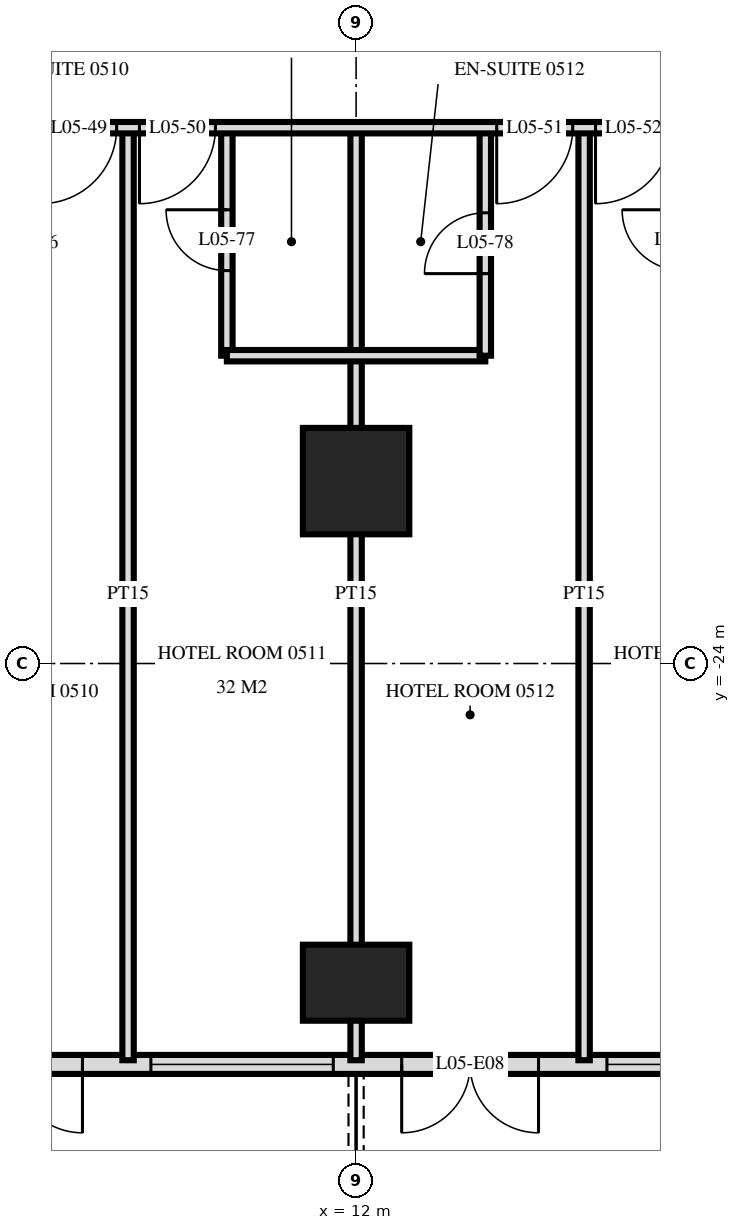
"""IFC4 building model, lengths in metres.
Left out: names, types, materials, properties, quantities, classifications, styles, units other than length and angle.
Written with IfcOpenShell. Run it as: python <this file> out.ifc"""

import sys

from ifc_helpers import new_model, si_unit, direction, frame, frame_2d, origin, origin_2d, place, context, subcontext, project, spatial, rectangle, extrude, element, fill, save


model = new_model("IFC4")
c1 = context("Model", 3, precision=1e-05, world=origin(), true_north=direction((0.0, 1.0)))
c2 = subcontext(c1, "Body", "Model", "MODEL_VIEW")
j1 = project(units=[si_unit("LENGTHUNIT", "METRE"), si_unit("PLANEANGLEUNIT", "RADIAN")], contexts=[c1])
p1 = place(None, origin())
s1 = spatial("IfcSite", under=j1, at=p1, CompositionType="ELEMENT")
p2 = place(p1, origin())
s2 = spatial("IfcBuilding", under=s1, at=p2, CompositionType="ELEMENT")
p3 = place(p2, frame((0.0, 0.0, 27.6)))
s3 = spatial("IfcBuildingStorey", under=s2, at=p3, CompositionType="ELEMENT", Elevation=27.6)
p4 = place(p3, frame((12.0, -28.2, 0.0), z_axis=(0.0, 0.0, 1.0), x_axis=(1.0, 0.0, 0.0)))
e1 = element("IfcColumn", 1, at=p4, inside=s3, PredefinedType="COLUMN", context=c2, shape_type="SweptSolid", body=[
    extrude(rectangle(XDim=1.4, YDim=1.0, at=origin_2d()), origin(), (0.0, 0.0, 1.0), 3.6),
])
p5 = place(p3, frame((12.0, -21.6, 0.0), z_axis=(0.0, 0.0, 1.0), x_axis=(1.0, 0.0, 0.0)))
e2 = element("IfcColumn", 2, at=p5, inside=s3, PredefinedType="COLUMN", context=c2, shape_type="SweptSolid", body=[
    extrude(rectangle(XDim=1.4, YDim=1.4, at=origin_2d()), origin(), (0.0, 0.0, 1.0), 3.6),
])
p6 = place(p3, frame((-28.775, -29.275, 0.0), z_axis=(0.0, 0.0, 1.0), x_axis=(1.0, 0.0, 0.0)))
e3 = element("IfcWall", 3, at=p6, inside=s3, PredefinedType="SOLIDWALL", context=c2, shape_type="SweptSolid", body=[
    extrude(rectangle(XDim=57.551, YDim=0.25, at=frame_2d((28.775, 0.0))), origin(), (0.0, 0.0, 1.0), 3.32),
])
p7 = place(p6, frame((0.575, 0.0, 0.0)))
e4 = element("IfcOpeningElement", 4, at=p7, cuts=e3, PredefinedType="OPENING", context=c2, shape_type="SweptSolid", body=[
    extrude(rectangle(XDim=1.8, YDim=2.4, at=frame_2d((0.9, 1.2))), frame((0.0, 0.135, 0.0), z_axis=(0.0, -1.0, 0.0), x_axis=(1.0, 0.0, 0.0)), (0.0, 0.0, 1.0), 0.27),
])
p8 = place(p6, frame((5.375, 0.0, 0.0)))
e5 = element("IfcOpeningElement", 5, at=p8, cuts=e3, PredefinedType="OPENING", context=c2, shape_type="SweptSolid", body=[
    extrude(rectangle(XDim=1.8, YDim=2.4, at=frame_2d((0.9, 1.2))), frame((0.0, 0.135, 0.0), z_axis=(0.0, -1.0, 0.0), x_axis=(1.0, 0.0, 0.0)), (0.0, 0.0, 1.0), 0.27),
])
p9 = place(p6, frame((8.075, 0.0, 0.3)))
e6 = element("IfcOpeningElement", 6, at=p9, cuts=e3, PredefinedType="OPENING", context=c2, shape_type="SweptSolid", body=[
    extrude(rectangle(XDim=2.4, YDim=2.1, at=frame_2d((1.2, 1.05))), frame((0.0, 0.135, 0.0), z_axis=(0.0, -1.0, 0.0), x_axis=(1.0, 0.0, 0.0)), (0.0, 0.0, 1.0), 0.27),
])
p10 = place(p6, frame((11.375, 0.0, 0.0)))
e7 = element("IfcOpeningElement", 7, at=p10, cuts=e3, PredefinedType="OPENING", context=c2, shape_type="SweptSolid", body=[
    extrude(rectangle(XDim=1.8, YDim=2.4, at=frame_2d((0.9, 1.2))), frame((0.0, 0.135, 0.0), z_axis=(0.0, -1.0, 0.0), x_axis=(1.0, 0.0, 0.0)), (0.0, 0.0, 1.0), 0.27),
])
p11 = place(p6, frame((14.075, 0.0, 0.3)))
e8 = element("IfcOpeningElement", 8, at=p11, cuts=e3, PredefinedType="OPENING", context=c2, shape_type="SweptSolid", body=[
    extrude(rectangle(XDim=2.4, YDim=2.1, at=frame_2d((1.2, 1.05))), frame((0.0, 0.135, 0.0), z_axis=(0.0, -1.0, 0.0), x_axis=(1.0, 0.0, 0.0)), (0.0, 0.0, 1.0), 0.27),
])
p12 = place(p6, frame((17.375, 0.0, 0.0)))
e9 = element("IfcOpeningElement", 9, at=p12, cuts=e3, PredefinedType="OPENING", context=c2, shape_type="SweptSolid", body=[
    extrude(rectangle(XDim=1.8, YDim=2.4, at=frame_2d((0.9, 1.2))), frame((0.0, 0.135, 0.0), z_axis=(0.0, -1.0, 0.0), x_axis=(1.0, 0.0, 0.0)), (0.0, 0.0, 1.0), 0.27),
])
p13 = place(p6, frame((20.075, 0.0, 0.3)))
e10 = element("IfcOpeningElement", 10, at=p13, cuts=e3, PredefinedType="OPENING", context=c2, shape_type="SweptSolid", body=[
    extrude(rectangle(XDim=2.4, YDim=2.1, at=frame_2d((1.2, 1.05))), frame((0.0, 0.135, 0.0), z_axis=(0.0, -1.0, 0.0), x_axis=(1.0, 0.0, 0.0)), (0.0, 0.0, 1.0), 0.27),
])
p14 = place(p6, frame((23.075, 0.0, 0.3)))
e11 = element("IfcOpeningElement", 11, at=p14, cuts=e3, PredefinedType="OPENING", context=c2, shape_type="SweptSolid", body=[
    extrude(rectangle(XDim=2.4, YDim=2.1, at=frame_2d((1.2, 1.05))), frame((0.0, 0.135, 0.0), z_axis=(0.0, -1.0, 0.0), x_axis=(1.0, 0.0, 0.0)), (0.0, 0.0, 1.0), 0.27),
])
p15 = place(p6, frame((26.375, 0.0, 0.0)))
e12 = element("IfcOpeningElement", 12, at=p15, cuts=e3, PredefinedType="OPENING", context=c2, shape_type="SweptSolid", body=[
    extrude(rectangle(XDim=1.8, YDim=2.4, at=frame_2d((0.9, 1.2))), frame((0.0, 0.135, 0.0), z_axis=(0.0, -1.0, 0.0), x_axis=(1.0, 0.0, 0.0)), (0.0, 0.0, 1.0), 0.27),
])
p16 = place(p6, frame((29.375, 0.0, 0.0)))
e13 = element("IfcOpeningElement", 13, at=p16, cuts=e3, PredefinedType="OPENING", context=c2, shape_type="SweptSolid", body=[
    extrude(rectangle(XDim=1.8, YDim=2.4, at=frame_2d((0.9, 1.2))), frame((0.0, 0.135, 0.0), z_axis=(0.0, -1.0, 0.0), x_axis=(1.0, 0.0, 0.0)), (0.0, 0.0, 1.0), 0.27),
])
p17 = place(p6, frame((32.075, 0.0, 0.3)))
e14 = element("IfcOpeningElement", 14, at=p17, cuts=e3, PredefinedType="OPENING", context=c2, shape_type="SweptSolid", body=[
    extrude(rectangle(XDim=2.4, YDim=2.1, at=frame_2d((1.2, 1.05))), frame((0.0, 0.135, 0.0), z_axis=(0.0, -1.0, 0.0), x_axis=(1.0, 0.0, 0.0)), (0.0, 0.0, 1.0), 0.27),
])
p18 = place(p6, frame((35.375, 0.0, 0.0)))
e15 = element("IfcOpeningElement", 15, at=p18, cuts=e3, PredefinedType="OPENING", context=c2, shape_type="SweptSolid", body=[
    extrude(rectangle(XDim=1.8, YDim=2.4, at=frame_2d((0.9, 1.2))), frame((0.0, 0.135, 0.0), z_axis=(0.0, -1.0, 0.0), x_axis=(1.0, 0.0, 0.0)), (0.0, 0.0, 1.0), 0.27),
])
p19 = place(p6, frame((38.075, 0.0, 0.3)))
e16 = element("IfcOpeningElement", 16, at=p19, cuts=e3, PredefinedType="OPENING", context=c2, shape_type="SweptSolid", body=[
    extrude(rectangle(XDim=2.4, YDim=2.1, at=frame_2d((1.2, 1.05))), frame((0.0, 0.135, 0.0), z_axis=(0.0, -1.0, 0.0), x_axis=(1.0, 0.0, 0.0)), (0.0, 0.0, 1.0), 0.27),
])
p20 = place(p6, frame((41.375, 0.0, 0.0)))
e17 = element("IfcOpeningElement", 17, at=p20, cuts=e3, PredefinedType="OPENING", context=c2, shape_type="SweptSolid", body=[
    extrude(rectangle(XDim=1.8, YDim=2.4, at=frame_2d((0.9, 1.2))), frame((0.0, 0.135, 0.0), z_axis=(0.0, -1.0, 0.0), x_axis=(1.0, 0.0, 0.0)), (0.0, 0.0, 1.0), 0.27),
])
p21 = place(p6, frame((44.075, 0.0, 0.3)))
e18 = element("IfcOpeningElement", 18, at=p21, cuts=e3, PredefinedType="OPENING", context=c2, shape_type="SweptSolid", body=[
    extrude(rectangle(XDim=2.4, YDim=2.1, at=frame_2d((1.2, 1.05))), frame((0.0, 0.135, 0.0), z_axis=(0.0, -1.0, 0.0), x_axis=(1.0, 0.0, 0.0)), (0.0, 0.0, 1.0), 0.27),
])
p22 = place(p6, frame((47.075, 0.0, 0.3)))
e19 = element("IfcOpeningElement", 19, at=p22, cuts=e3, PredefinedType="OPENING", context=c2, shape_type="SweptSolid", body=[
    extrude(rectangle(XDim=2.4, YDim=2.1, at=frame_2d((1.2, 1.05))), frame((0.0, 0.135, 0.0), z_axis=(0.0, -1.0, 0.0), x_axis=(1.0, 0.0, 0.0)), (0.0, 0.0, 1.0), 0.27),
])
p23 = place(p6, frame((50.375, 0.0, 0.0)))
e20 = element("IfcOpeningElement", 20, at=p23, cuts=e3, PredefinedType="OPENING", context=c2, shape_type="SweptSolid", body=[
    extrude(rectangle(XDim=1.8, YDim=2.4, at=frame_2d((0.9, 1.2))), frame((0.0, 0.135, 0.0), z_axis=(0.0, -1.0, 0.0), x_axis=(1.0, 0.0, 0.0)), (0.0, 0.0, 1.0), 0.27),
])
p24 = place(p6, frame((53.375, 0.0, 0.0)))
e21 = element("IfcOpeningElement", 21, at=p24, cuts=e3, PredefinedType="OPENING", context=c2, shape_type="SweptSolid", body=[
    extrude(rectangle(XDim=1.8, YDim=2.4, at=frame_2d((0.9, 1.2))), frame((0.0, 0.135, 0.0), z_axis=(0.0, -1.0, 0.0), x_axis=(1.0, 0.0, 0.0)), (0.0, 0.0, 1.0), 0.27),
])
p25 = place(p3, frame((15.0, -29.22, 0.0), z_axis=(0.0, 0.0, 1.0), x_axis=(0.0, 1.0, 0.0)))
e22 = element("IfcWall", 22, at=p25, inside=s3, PredefinedType="PARTITIONING", context=c2, shape_type="SweptSolid", body=[
    extrude(rectangle(XDim=12.27, YDim=0.15, at=frame_2d((6.135, 0.0))), origin(), (0.0, 0.0, 1.0), 3.32),
])
p26 = place(p3, frame((13.7, -19.95, 0.0), z_axis=(0.0, 0.0, 1.0), x_axis=(0.0, 1.0, 0.0)))
e23 = element("IfcWall", 23, at=p26, inside=s3, PredefinedType="PARTITIONING", context=c2, shape_type="SweptSolid", body=[
    extrude(rectangle(XDim=3.0, YDim=0.15, at=frame_2d((1.5, 0.0))), origin(), (0.0, 0.0, 1.0), 3.32),
])
p27 = place(p26, frame((1.08, 0.0, 0.0)))
e24 = element("IfcOpeningElement", 24, at=p27, cuts=e23, PredefinedType="OPENING", context=c2, shape_type="SweptSolid", body=[
    extrude(rectangle(XDim=0.8, YDim=2.1, at=frame_2d((0.4, 1.05))), frame((0.0, 0.085, 0.0), z_axis=(0.0, -1.0, 0.0), x_axis=(1.0, 0.0, 0.0)), (0.0, 0.0, 1.0), 0.17),
])
p28 = place(p3, frame((12.0, -29.22, 0.0), z_axis=(0.0, 0.0, 1.0), x_axis=(0.0, 1.0, 0.0)))
e25 = element("IfcWall", 25, at=p28, inside=s3, PredefinedType="PARTITIONING", context=c2, shape_type="SweptSolid", body=[
    extrude(rectangle(XDim=12.27, YDim=0.15, at=frame_2d((6.135, 0.0))), origin(), (0.0, 0.0, 1.0), 3.32),
])
p29 = place(p3, frame((10.3, -19.95, 0.0), z_axis=(0.0, 0.0, 1.0), x_axis=(0.0, 1.0, 0.0)))
e26 = element("IfcWall", 26, at=p29, inside=s3, PredefinedType="PARTITIONING", context=c2, shape_type="SweptSolid", body=[
    extrude(rectangle(XDim=3.0, YDim=0.15, at=frame_2d((1.5, 0.0))), origin(), (0.0, 0.0, 1.0), 3.32),
])
p30 = place(p29, frame((1.12, 0.0, 0.0)))
e27 = element("IfcOpeningElement", 27, at=p30, cuts=e26, PredefinedType="OPENING", context=c2, shape_type="SweptSolid", body=[
    extrude(rectangle(XDim=0.8, YDim=2.1, at=frame_2d((0.4, 1.05))), frame((0.0, 0.085, 0.0), z_axis=(0.0, -1.0, 0.0), x_axis=(1.0, 0.0, 0.0)), (0.0, 0.0, 1.0), 0.17),
])
p31 = place(p3, frame((9.0, -29.22, 0.0), z_axis=(0.0, 0.0, 1.0), x_axis=(0.0, 1.0, 0.0)))
e28 = element("IfcWall", 28, at=p31, inside=s3, PredefinedType="PARTITIONING", context=c2, shape_type="SweptSolid", body=[
    extrude(rectangle(XDim=12.27, YDim=0.15, at=frame_2d((6.135, 0.0))), origin(), (0.0, 0.0, 1.0), 3.32),
])
p32 = place(p3, frame((10.3, -19.95, 0.0), z_axis=(0.0, 0.0, 1.0), x_axis=(1.0, 0.0, 0.0)))
e29 = element("IfcWall", 29, at=p32, inside=s3, PredefinedType="PARTITIONING", context=c2, shape_type="SweptSolid", body=[
    extrude(rectangle(XDim=3.4, YDim=0.15, at=frame_2d((1.7, 0.0))), origin(), (0.0, 0.0, 1.0), 3.32),
])
p33 = place(p3, frame((-33.12, -16.95, 0.0), z_axis=(0.0, 0.0, 1.0), x_axis=(1.0, 0.0, 0.0)))
e30 = element("IfcWall", 30, at=p33, inside=s3, PredefinedType="PARTITIONING", context=c2, shape_type="SweptSolid", body=[
    extrude(rectangle(XDim=66.24, YDim=0.15, at=frame_2d((33.12, 0.0))), origin(), (0.0, 0.0, 1.0), 3.32),
])
p34 = place(p33, frame((9.27, 0.0, 0.0)))
e31 = element("IfcOpeningElement", 31, at=p34, cuts=e30, PredefinedType="OPENING", context=c2, shape_type="SweptSolid", body=[
    extrude(rectangle(XDim=1.0, YDim=2.1, at=frame_2d((0.5, 1.05))), frame((0.0, 0.085, 0.0), z_axis=(0.0, -1.0, 0.0), x_axis=(1.0, 0.0, 0.0)), (0.0, 0.0, 1.0), 0.17),
])
p35 = place(p33, frame((13.97, 0.0, 0.0)))
e32 = element("IfcOpeningElement", 32, at=p35, cuts=e30, PredefinedType="OPENING", context=c2, shape_type="SweptSolid", body=[
    extrude(rectangle(XDim=1.0, YDim=2.1, at=frame_2d((0.5, 1.05))), frame((0.0, 0.085, 0.0), z_axis=(0.0, -1.0, 0.0), x_axis=(1.0, 0.0, 0.0)), (0.0, 0.0, 1.0), 0.17),
])
p36 = place(p33, frame((15.27, 0.0, 0.0)))
e33 = element("IfcOpeningElement", 33, at=p36, cuts=e30, PredefinedType="OPENING", context=c2, shape_type="SweptSolid", body=[
    extrude(rectangle(XDim=1.0, YDim=2.1, at=frame_2d((0.5, 1.05))), frame((0.0, 0.085, 0.0), z_axis=(0.0, -1.0, 0.0), x_axis=(1.0, 0.0, 0.0)), (0.0, 0.0, 1.0), 0.17),
])
p37 = place(p33, frame((19.97, 0.0, 0.0)))
e34 = element("IfcOpeningElement", 34, at=p37, cuts=e30, PredefinedType="OPENING", context=c2, shape_type="SweptSolid", body=[
    extrude(rectangle(XDim=1.0, YDim=2.1, at=frame_2d((0.5, 1.05))), frame((0.0, 0.085, 0.0), z_axis=(0.0, -1.0, 0.0), x_axis=(1.0, 0.0, 0.0)), (0.0, 0.0, 1.0), 0.17),
])
p38 = place(p33, frame((22.27, 0.0, 0.0)))
e35 = element("IfcOpeningElement", 35, at=p38, cuts=e30, PredefinedType="OPENING", context=c2, shape_type="SweptSolid", body=[
    extrude(rectangle(XDim=1.0, YDim=2.1, at=frame_2d((0.5, 1.05))), frame((0.0, 0.085, 0.0), z_axis=(0.0, -1.0, 0.0), x_axis=(1.0, 0.0, 0.0)), (0.0, 0.0, 1.0), 0.17),
])
p39 = place(p33, frame((28.97, 0.0, 0.0)))
e36 = element("IfcOpeningElement", 36, at=p39, cuts=e30, PredefinedType="OPENING", context=c2, shape_type="SweptSolid", body=[
    extrude(rectangle(XDim=1.0, YDim=2.1, at=frame_2d((0.5, 1.05))), frame((0.0, 0.085, 0.0), z_axis=(0.0, -1.0, 0.0), x_axis=(1.0, 0.0, 0.0)), (0.0, 0.0, 1.0), 0.17),
])
p40 = place(p33, frame((30.27, 0.0, 0.0)))
e37 = element("IfcOpeningElement", 37, at=p40, cuts=e30, PredefinedType="OPENING", context=c2, shape_type="SweptSolid", body=[
    extrude(rectangle(XDim=1.0, YDim=2.1, at=frame_2d((0.5, 1.05))), frame((0.0, 0.085, 0.0), z_axis=(0.0, -1.0, 0.0), x_axis=(1.0, 0.0, 0.0)), (0.0, 0.0, 1.0), 0.17),
])
p41 = place(p33, frame((34.97, 0.0, 0.0)))
e38 = element("IfcOpeningElement", 38, at=p41, cuts=e30, PredefinedType="OPENING", context=c2, shape_type="SweptSolid", body=[
    extrude(rectangle(XDim=1.0, YDim=2.1, at=frame_2d((0.5, 1.05))), frame((0.0, 0.085, 0.0), z_axis=(0.0, -1.0, 0.0), x_axis=(1.0, 0.0, 0.0)), (0.0, 0.0, 1.0), 0.17),
])
p42 = place(p33, frame((36.27, 0.0, 0.0)))
e39 = element("IfcOpeningElement", 39, at=p42, cuts=e30, PredefinedType="OPENING", context=c2, shape_type="SweptSolid", body=[
    extrude(rectangle(XDim=1.0, YDim=2.1, at=frame_2d((0.5, 1.05))), frame((0.0, 0.085, 0.0), z_axis=(0.0, -1.0, 0.0), x_axis=(1.0, 0.0, 0.0)), (0.0, 0.0, 1.0), 0.17),
])
p43 = place(p33, frame((40.97, 0.0, 0.0)))
e40 = element("IfcOpeningElement", 40, at=p43, cuts=e30, PredefinedType="OPENING", context=c2, shape_type="SweptSolid", body=[
    extrude(rectangle(XDim=1.0, YDim=2.1, at=frame_2d((0.5, 1.05))), frame((0.0, 0.085, 0.0), z_axis=(0.0, -1.0, 0.0), x_axis=(1.0, 0.0, 0.0)), (0.0, 0.0, 1.0), 0.17),
])
p44 = place(p33, frame((42.27, 0.0, 0.0)))
e41 = element("IfcOpeningElement", 41, at=p44, cuts=e30, PredefinedType="OPENING", context=c2, shape_type="SweptSolid", body=[
    extrude(rectangle(XDim=1.0, YDim=2.1, at=frame_2d((0.5, 1.05))), frame((0.0, 0.085, 0.0), z_axis=(0.0, -1.0, 0.0), x_axis=(1.0, 0.0, 0.0)), (0.0, 0.0, 1.0), 0.17),
])
p45 = place(p33, frame((46.97, 0.0, 0.0)))
e42 = element("IfcOpeningElement", 42, at=p45, cuts=e30, PredefinedType="OPENING", context=c2, shape_type="SweptSolid", body=[
    extrude(rectangle(XDim=1.0, YDim=2.1, at=frame_2d((0.5, 1.05))), frame((0.0, 0.085, 0.0), z_axis=(0.0, -1.0, 0.0), x_axis=(1.0, 0.0, 0.0)), (0.0, 0.0, 1.0), 0.17),
])
p46 = place(p33, frame((48.27, 0.0, 0.0)))
e43 = element("IfcOpeningElement", 43, at=p46, cuts=e30, PredefinedType="OPENING", context=c2, shape_type="SweptSolid", body=[
    extrude(rectangle(XDim=1.0, YDim=2.1, at=frame_2d((0.5, 1.05))), frame((0.0, 0.085, 0.0), z_axis=(0.0, -1.0, 0.0), x_axis=(1.0, 0.0, 0.0)), (0.0, 0.0, 1.0), 0.17),
])
p47 = place(p33, frame((52.97, 0.0, 0.0)))
e44 = element("IfcOpeningElement", 44, at=p47, cuts=e30, PredefinedType="OPENING", context=c2, shape_type="SweptSolid", body=[
    extrude(rectangle(XDim=1.0, YDim=2.1, at=frame_2d((0.5, 1.05))), frame((0.0, 0.085, 0.0), z_axis=(0.0, -1.0, 0.0), x_axis=(1.0, 0.0, 0.0)), (0.0, 0.0, 1.0), 0.17),
])
p48 = place(p33, frame((54.27, 0.0, 0.0)))
e45 = element("IfcOpeningElement", 45, at=p48, cuts=e30, PredefinedType="OPENING", context=c2, shape_type="SweptSolid", body=[
    extrude(rectangle(XDim=1.0, YDim=2.1, at=frame_2d((0.5, 1.05))), frame((0.0, 0.085, 0.0), z_axis=(0.0, -1.0, 0.0), x_axis=(1.0, 0.0, 0.0)), (0.0, 0.0, 1.0), 0.17),
])
p49 = place(p33, frame((4.4, 0.0, 0.0)))
e46 = element("IfcOpeningElement", 46, at=p49, cuts=e30, PredefinedType="OPENING", context=c2, shape_type="SweptSolid", body=[
    extrude(rectangle(XDim=1.0, YDim=2.1, at=frame_2d((0.5, 1.05))), frame((0.0, 0.085, 0.0), z_axis=(0.0, -1.0, 0.0), x_axis=(1.0, 0.0, 0.0)), (0.0, 0.0, 1.0), 0.17),
])
p50 = place(p33, frame((60.8, 0.0, 0.0)))
e47 = element("IfcOpeningElement", 47, at=p50, cuts=e30, PredefinedType="OPENING", context=c2, shape_type="SweptSolid", body=[
    extrude(rectangle(XDim=1.0, YDim=2.1, at=frame_2d((0.5, 1.05))), frame((0.0, 0.085, 0.0), z_axis=(0.0, -1.0, 0.0), x_axis=(1.0, 0.0, 0.0)), (0.0, 0.0, 1.0), 0.17),
])
p51 = place(p18, frame((0.9, 0.0, 0.0), z_axis=(0.0, 0.0, 1.0), x_axis=(-1.0, 0.0, 0.0)))
e48 = element("IfcDoor", 48, at=p51, inside=s3, OperationType="DOUBLE_DOOR_SINGLE_SWING", PredefinedType="DOOR", context=c2, shape_type="SweptSolid", body=[
    extrude(rectangle(XDim=1.8, YDim=2.4, at=frame_2d((0.0, 1.2))), frame((0.0, -0.025, 0.0), z_axis=(0.0, 1.0, 0.0), x_axis=(-1.0, 0.0, 0.0)), (0.0, 0.0, 1.0), 0.05),
])
fill(e15, e48)
p52 = place(p19, origin())
e49 = element("IfcWindow", 49, at=p52, inside=s3, PartitioningType="SINGLE_PANEL", PredefinedType="WINDOW", context=c2, shape_type="SweptSolid", body=[
    extrude(rectangle(XDim=2.4, YDim=2.1, at=frame_2d((1.2, 1.05))), frame((0.0, 0.03, 0.0), z_axis=(0.0, -1.0, 0.0), x_axis=(1.0, 0.0, 0.0)), (0.0, 0.0, 1.0), 0.06),
])
fill(e16, e49)
p53 = place(p20, frame((0.9, 0.0, 0.0), z_axis=(0.0, 0.0, 1.0), x_axis=(-1.0, 0.0, 0.0)))
e50 = element("IfcDoor", 50, at=p53, inside=s3, OperationType="DOUBLE_DOOR_SINGLE_SWING", PredefinedType="DOOR", context=c2, shape_type="SweptSolid", body=[
    extrude(rectangle(XDim=1.8, YDim=2.4, at=frame_2d((0.0, 1.2))), frame((0.0, -0.025, 0.0), z_axis=(0.0, 1.0, 0.0), x_axis=(-1.0, 0.0, 0.0)), (0.0, 0.0, 1.0), 0.05),
])
fill(e17, e50)
p54 = place(p21, origin())
e51 = element("IfcWindow", 51, at=p54, inside=s3, PartitioningType="SINGLE_PANEL", PredefinedType="WINDOW", context=c2, shape_type="SweptSolid", body=[
    extrude(rectangle(XDim=2.4, YDim=2.1, at=frame_2d((1.2, 1.05))), frame((0.0, 0.03, 0.0), z_axis=(0.0, -1.0, 0.0), x_axis=(1.0, 0.0, 0.0)), (0.0, 0.0, 1.0), 0.06),
])
fill(e18, e51)
p55 = place(p43, frame((0.5, 0.0, 0.0), z_axis=(0.0, 0.0, 1.0), x_axis=(-1.0, 0.0, 0.0)))
e52 = element("IfcDoor", 52, at=p55, inside=s3, OperationType="SINGLE_SWING_LEFT", PredefinedType="DOOR", context=c2, shape_type="SweptSolid", body=[
    extrude(rectangle(XDim=1.0, YDim=2.1, at=frame_2d((0.0, 1.05))), frame((0.0, -0.025, 0.0), z_axis=(0.0, 1.0, 0.0), x_axis=(-1.0, 0.0, 0.0)), (0.0, 0.0, 1.0), 0.05),
])
fill(e40, e52)
p56 = place(p44, frame((0.5, 0.0, 0.0), z_axis=(0.0, 0.0, 1.0), x_axis=(-1.0, 0.0, 0.0)))
e53 = element("IfcDoor", 53, at=p56, inside=s3, OperationType="SINGLE_SWING_LEFT", PredefinedType="DOOR", context=c2, shape_type="SweptSolid", body=[
    extrude(rectangle(XDim=1.0, YDim=2.1, at=frame_2d((0.0, 1.05))), frame((0.0, -0.025, 0.0), z_axis=(0.0, 1.0, 0.0), x_axis=(-1.0, 0.0, 0.0)), (0.0, 0.0, 1.0), 0.05),
])
fill(e41, e53)
p57 = place(p45, frame((0.5, 0.0, 0.0), z_axis=(0.0, 0.0, 1.0), x_axis=(-1.0, 0.0, 0.0)))
e54 = element("IfcDoor", 54, at=p57, inside=s3, OperationType="SINGLE_SWING_LEFT", PredefinedType="DOOR", context=c2, shape_type="SweptSolid", body=[
    extrude(rectangle(XDim=1.0, YDim=2.1, at=frame_2d((0.0, 1.05))), frame((0.0, -0.025, 0.0), z_axis=(0.0, 1.0, 0.0), x_axis=(-1.0, 0.0, 0.0)), (0.0, 0.0, 1.0), 0.05),
])
fill(e42, e54)
p58 = place(p46, frame((0.5, 0.0, 0.0), z_axis=(0.0, 0.0, 1.0), x_axis=(-1.0, 0.0, 0.0)))
e55 = element("IfcDoor", 55, at=p58, inside=s3, OperationType="SINGLE_SWING_LEFT", PredefinedType="DOOR", context=c2, shape_type="SweptSolid", body=[
    extrude(rectangle(XDim=1.0, YDim=2.1, at=frame_2d((0.0, 1.05))), frame((0.0, -0.025, 0.0), z_axis=(0.0, 1.0, 0.0), x_axis=(-1.0, 0.0, 0.0)), (0.0, 0.0, 1.0), 0.05),
])
fill(e43, e55)
p59 = place(p30, origin())
e56 = element("IfcDoor", 56, at=p59, inside=s3, OperationType="SINGLE_SWING_LEFT", PredefinedType="DOOR", context=c2, shape_type="SweptSolid", body=[
    extrude(rectangle(XDim=0.8, YDim=2.1, at=frame_2d((0.4, 1.05))), frame((0.0, 0.025, 0.0), z_axis=(0.0, -1.0, 0.0), x_axis=(1.0, 0.0, 0.0)), (0.0, 0.0, 1.0), 0.05),
])
fill(e27, e56)
p60 = place(p27, origin())
e57 = element("IfcDoor", 57, at=p60, inside=s3, OperationType="SINGLE_SWING_RIGHT", PredefinedType="DOOR", context=c2, shape_type="SweptSolid", body=[
    extrude(rectangle(XDim=0.8, YDim=2.1, at=frame_2d((0.4, 1.05))), frame((0.0, 0.025, 0.0), z_axis=(0.0, -1.0, 0.0), x_axis=(1.0, 0.0, 0.0)), (0.0, 0.0, 1.0), 0.05),
])
fill(e24, e57)
save(model, sys.argv[1])
